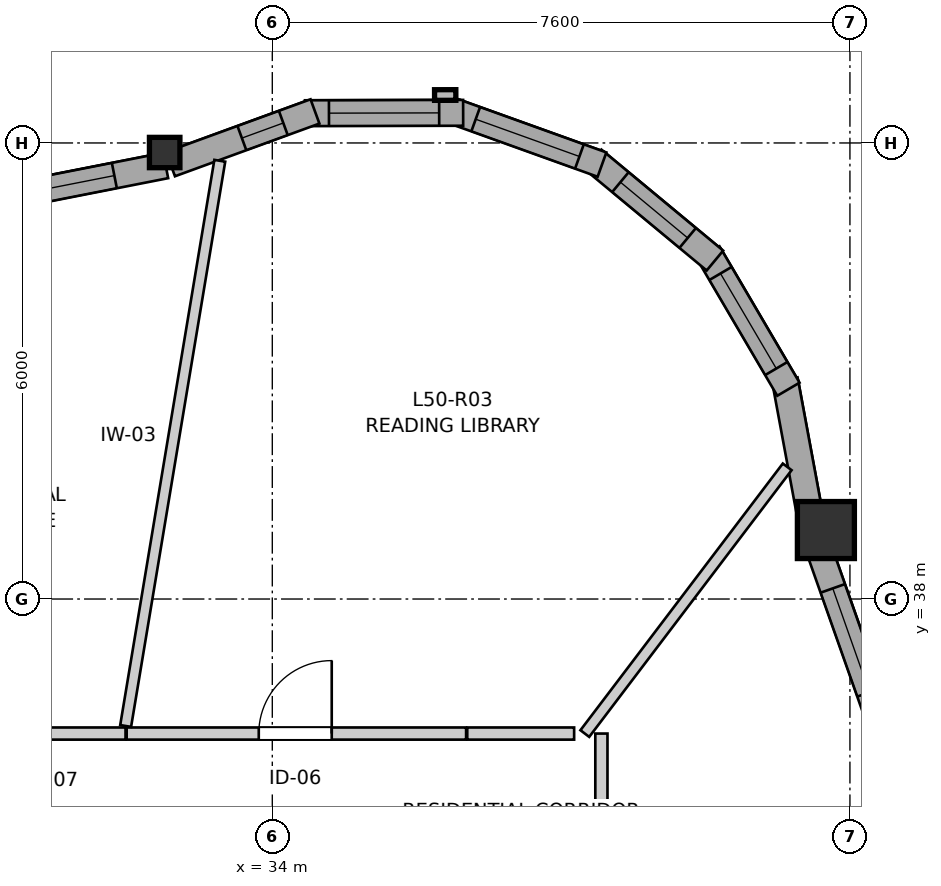
"""IFC4 building model, lengths in metres.
Left out: names, types, materials, properties, quantities, classifications, styles, units other than length and angle.
Written with IfcOpenShell. Run it as: python <this file> out.ifc"""

import sys

from ifc_helpers import new_model, si_unit, direction, frame, frame_2d, origin, origin_2d, place, context, subcontext, project, spatial, rectangle, i_section, extrude, source, transform, mapped, element, fill, save


model = new_model("IFC4")
c1 = context("Model", 3, precision=1e-05, world=origin(), true_north=direction((0.0, 1.0)))
c2 = subcontext(c1, "Body", "Model", "MODEL_VIEW")
j1 = project(units=[si_unit("LENGTHUNIT", "METRE"), si_unit("PLANEANGLEUNIT", "RADIAN")], contexts=[c1])
p1 = place(None, origin())
s1 = spatial("IfcSite", under=j1, at=p1, CompositionType="ELEMENT")
p2 = place(p1, origin())
s2 = spatial("IfcBuilding", under=s1, at=p2, CompositionType="ELEMENT")
p3 = place(p2, frame((0.0, 0.0, 168.2)))
s3 = spatial("IfcBuildingStorey", under=s2, at=p3, CompositionType="ELEMENT", Elevation=168.2)
m1 = source(origin(), c2, "Body", "SweptSolid", [
    extrude(rectangle(XDim=0.75, YDim=0.75, at=origin_2d()), origin(), (0.0, 0.0, 1.0), 2.95),
])
p4 = place(p3, frame((41.284, 38.907, 0.0), z_axis=(0.0, 0.0, 1.0), x_axis=(1.0, 0.0, 0.0)))
e1 = element("IfcColumn", 1, at=p4, inside=s3, PredefinedType="COLUMN", context=c2, shape_type="MappedRepresentation", body=[
    mapped(m1, transform((0.0, 0.0, 0.0), x_axis=(1.0, 0.0, 0.0), y_axis=(0.0, 1.0, 0.0), z_axis=(0.0, 0.0, 1.0), scale=1.0)),
])
m2 = source(origin(), c2, "Body", "SweptSolid", [
    extrude(i_section(OverallWidth=0.401, OverallDepth=0.399, WebThickness=0.023, FlangeThickness=0.036, FilletRadius=0.015, at=origin_2d()), origin(), (0.0, 0.0, 1.0), 2.95),
])
p5 = place(p3, frame((32.584, 43.874, 0.0), z_axis=(0.0, 0.0, 1.0), x_axis=(1.0, 0.0, 0.0)))
e2 = element("IfcColumn", 2, at=p5, inside=s3, PredefinedType="PILASTER", context=c2, shape_type="MappedRepresentation", body=[
    mapped(m2, transform((0.0, 0.0, 0.0), x_axis=(1.0, 0.0, 0.0), y_axis=(0.0, 1.0, 0.0), z_axis=(0.0, 0.0, 1.0), scale=1.0)),
])
p6 = place(p3, frame((42.059, 36.198, 0.0), z_axis=(0.0, 0.0, 1.0), x_axis=(-0.332714406781, 0.943027636668, 0.0)))
e3 = element("IfcWall", 3, at=p6, inside=s3, PredefinedType="SOLIDWALL", context=c2, shape_type="SweptSolid", body=[
    extrude(rectangle(XDim=2.658, YDim=0.34, at=frame_2d((1.329, 0.0))), origin(), (0.0, 0.0, 1.0), 2.53),
])
p7 = place(p6, frame((0.609, 0.0, 0.82)))
e4 = element("IfcOpeningElement", 4, at=p7, cuts=e3, PredefinedType="OPENING", context=c2, shape_type="SweptSolid", body=[
    extrude(rectangle(XDim=1.45, YDim=1.25, at=frame_2d((0.725, 0.625))), frame((0.0, 0.18, 0.0), z_axis=(0.0, -1.0, 0.0), x_axis=(1.0, 0.0, 0.0)), (0.0, 0.0, 1.0), 0.36),
])
p8 = place(p3, frame((41.088, 39.029, 0.0), z_axis=(0.0, 0.0, 1.0), x_axis=(-0.18244577317, 0.983215917209, 0.0)))
e5 = element("IfcWall", 5, at=p8, inside=s3, PredefinedType="SOLIDWALL", context=c2, shape_type="SweptSolid", body=[
    extrude(rectangle(XDim=1.888, YDim=0.34, at=frame_2d((0.944, 0.0))), origin(), (0.0, 0.0, 1.0), 2.53),
])
p9 = place(p3, frame((40.791, 40.76, 0.0), z_axis=(0.0, 0.0, 1.0), x_axis=(-0.506225227923, 0.862401309493, 0.0)))
e6 = element("IfcWall", 6, at=p9, inside=s3, PredefinedType="SOLIDWALL", context=c2, shape_type="SweptSolid", body=[
    extrude(rectangle(XDim=2.081, YDim=0.34, at=frame_2d((1.041, 0.0))), origin(), (0.0, 0.0, 1.0), 2.53),
])
p10 = place(p9, frame((0.315, 0.0, 0.82)))
e7 = element("IfcOpeningElement", 7, at=p10, cuts=e6, PredefinedType="OPENING", context=c2, shape_type="SweptSolid", body=[
    extrude(rectangle(XDim=1.45, YDim=1.25, at=frame_2d((0.725, 0.625))), frame((0.0, 0.18, 0.0), z_axis=(0.0, -1.0, 0.0), x_axis=(1.0, 0.0, 0.0)), (0.0, 0.0, 1.0), 0.36),
])
p11 = place(p3, frame((39.823, 42.453, 0.0), z_axis=(0.0, 0.0, 1.0), x_axis=(-0.769690471148, 0.63841724493, 0.0)))
e8 = element("IfcWall", 8, at=p11, inside=s3, PredefinedType="SOLIDWALL", context=c2, shape_type="SweptSolid", body=[
    extrude(rectangle(XDim=2.081, YDim=0.34, at=frame_2d((1.041, 0.0))), origin(), (0.0, 0.0, 1.0), 2.53),
])
p12 = place(p11, frame((0.466, 0.0, 0.82)))
e9 = element("IfcOpeningElement", 9, at=p12, cuts=e8, PredefinedType="OPENING", context=c2, shape_type="SweptSolid", body=[
    extrude(rectangle(XDim=1.15, YDim=1.2, at=frame_2d((0.575, 0.6))), frame((0.0, 0.18, 0.0), z_axis=(0.0, -1.0, 0.0), x_axis=(1.0, 0.0, 0.0)), (0.0, 0.0, 1.0), 0.36),
])
p13 = place(p3, frame((38.338, 43.715, 0.0), z_axis=(0.0, 0.0, 1.0), x_axis=(-0.941071215914, 0.338208466153, 0.0)))
e10 = element("IfcWall", 10, at=p13, inside=s3, PredefinedType="SOLIDWALL", context=c2, shape_type="SweptSolid", body=[
    extrude(rectangle(XDim=2.081, YDim=0.34, at=frame_2d((1.041, 0.0))), origin(), (0.0, 0.0, 1.0), 2.53),
])
p14 = place(p13, frame((0.315, 0.0, 0.82)))
e11 = element("IfcOpeningElement", 11, at=p14, cuts=e10, PredefinedType="OPENING", context=c2, shape_type="SweptSolid", body=[
    extrude(rectangle(XDim=1.45, YDim=1.25, at=frame_2d((0.725, 0.625))), frame((0.0, 0.18, 0.0), z_axis=(0.0, -1.0, 0.0), x_axis=(1.0, 0.0, 0.0)), (0.0, 0.0, 1.0), 0.36),
])
p15 = place(p3, frame((36.511, 44.396, 0.0), z_axis=(0.0, 0.0, 1.0), x_axis=(-0.999996965272, -0.002463624621, 0.0)))
e12 = element("IfcWall", 12, at=p15, inside=s3, PredefinedType="SOLIDWALL", context=c2, shape_type="SweptSolid", body=[
    extrude(rectangle(XDim=2.081, YDim=0.34, at=frame_2d((1.041, 0.0))), origin(), (0.0, 0.0, 1.0), 2.53),
])
p16 = place(p15, frame((0.316, 0.0, 0.82)))
e13 = element("IfcOpeningElement", 13, at=p16, cuts=e12, PredefinedType="OPENING", context=c2, shape_type="SweptSolid", body=[
    extrude(rectangle(XDim=1.45, YDim=1.25, at=frame_2d((0.725, 0.625))), frame((0.0, 0.18, 0.0), z_axis=(0.0, -1.0, 0.0), x_axis=(1.0, 0.0, 0.0)), (0.0, 0.0, 1.0), 0.36),
])
p17 = place(p3, frame((34.562, 44.415, 0.0), z_axis=(0.0, 0.0, 1.0), x_axis=(-0.939426417976, -0.342750645819, 0.0)))
e14 = element("IfcWall", 14, at=p17, inside=s3, PredefinedType="SOLIDWALL", context=c2, shape_type="SweptSolid", body=[
    extrude(rectangle(XDim=2.023, YDim=0.34, at=frame_2d((1.011, 0.0))), origin(), (0.0, 0.0, 1.0), 2.53),
])
p18 = place(p17, frame((0.444, 0.0, 0.82)))
e15 = element("IfcOpeningElement", 15, at=p18, cuts=e14, PredefinedType="OPENING", context=c2, shape_type="SweptSolid", body=[
    extrude(rectangle(XDim=0.58, YDim=1.35, at=frame_2d((0.29, 0.675))), frame((0.0, 0.18, 0.0), z_axis=(0.0, -1.0, 0.0), x_axis=(1.0, 0.0, 0.0)), (0.0, 0.0, 1.0), 0.36),
])
p19 = place(p3, frame((32.597, 43.704, 0.0), z_axis=(0.0, 0.0, 1.0), x_axis=(-0.981214876679, -0.192918028667, 0.0)))
e16 = element("IfcWall", 16, at=p19, inside=s3, PredefinedType="SOLIDWALL", context=c2, shape_type="SweptSolid", body=[
    extrude(rectangle(XDim=2.746, YDim=0.34, at=frame_2d((1.373, 0.0))), origin(), (0.0, 0.0, 1.0), 2.53),
])
p20 = place(p19, frame((0.688, 0.0, 0.82)))
e17 = element("IfcOpeningElement", 17, at=p20, cuts=e16, PredefinedType="OPENING", context=c2, shape_type="SweptSolid", body=[
    extrude(rectangle(XDim=1.35, YDim=1.45, at=frame_2d((0.675, 0.725))), frame((0.0, 0.18, 0.0), z_axis=(0.0, -1.0, 0.0), x_axis=(1.0, 0.0, 0.0)), (0.0, 0.0, 1.0), 0.36),
])
p21 = place(p3, frame((24.201, 36.23, 0.0), z_axis=(0.0, 0.0, 1.0), x_axis=(1.0, 0.0, 0.0)))
e18 = element("IfcWall", 18, at=p21, inside=s3, PredefinedType="PARTITIONING", context=c2, shape_type="SweptSolid", body=[
    extrude(rectangle(XDim=7.868, YDim=0.16, at=frame_2d((3.934, 0.0))), origin(), (0.0, 0.0, 1.0), 2.95),
])
p22 = place(p21, frame((3.456, 0.0, 0.0)))
e19 = element("IfcOpeningElement", 19, at=p22, cuts=e18, PredefinedType="OPENING", context=c2, shape_type="SweptSolid", body=[
    extrude(rectangle(XDim=0.96, YDim=2.1, at=frame_2d((0.48, 1.05))), frame((0.0, 0.09, 0.0), z_axis=(0.0, -1.0, 0.0), x_axis=(1.0, 0.0, 0.0)), (0.0, 0.0, 1.0), 0.18),
])
p23 = place(p3, frame((32.084, 36.23, 0.0), z_axis=(0.0, 0.0, 1.0), x_axis=(1.0, 0.0, 0.0)))
e20 = element("IfcWall", 20, at=p23, inside=s3, PredefinedType="PARTITIONING", context=c2, shape_type="SweptSolid", body=[
    extrude(rectangle(XDim=4.466, YDim=0.16, at=frame_2d((2.233, 0.0))), origin(), (0.0, 0.0, 1.0), 2.588),
])
p24 = place(p23, frame((1.738, 0.0, 0.0)))
e21 = element("IfcOpeningElement", 21, at=p24, cuts=e20, PredefinedType="OPENING", context=c2, shape_type="SweptSolid", body=[
    extrude(rectangle(XDim=0.96, YDim=2.1, at=frame_2d((0.48, 1.05))), frame((0.0, 0.09, 0.0), z_axis=(0.0, -1.0, 0.0), x_axis=(1.0, 0.0, 0.0)), (0.0, 0.0, 1.0), 0.18),
])
p25 = place(p3, frame((32.071, 36.33, 0.0), z_axis=(0.0, 0.0, 1.0), x_axis=(0.164299199522, 0.986410549942, 0.0)))
e22 = element("IfcWall", 22, at=p25, inside=s3, PredefinedType="PARTITIONING", context=c2, shape_type="SweptSolid", body=[
    extrude(rectangle(XDim=7.538, YDim=0.145, at=frame_2d((3.769, 0.0))), origin(), (0.0, 0.0, 1.0), 2.95),
])
p26 = place(p3, frame((38.112, 36.23, 0.0), z_axis=(0.0, 0.0, 1.0), x_axis=(0.604495658019, 0.796608435453, 0.0)))
e23 = element("IfcWall", 23, at=p26, inside=s3, PredefinedType="PARTITIONING", context=c2, shape_type="SweptSolid", body=[
    extrude(rectangle(XDim=4.405, YDim=0.145, at=frame_2d((2.202, 0.0))), origin(), (0.0, 0.0, 1.0), 2.95),
])
p27 = place(p3, frame((38.33, 34.465, 0.0), z_axis=(0.0, 0.0, 1.0), x_axis=(0.0, 1.0, 0.0)))
e24 = element("IfcWall", 24, at=p27, inside=s3, PredefinedType="PARTITIONING", context=c2, shape_type="SweptSolid", body=[
    extrude(rectangle(XDim=1.765, YDim=0.16, at=frame_2d((0.882, 0.0))), origin(), (0.0, 0.0, 1.0), 2.588),
])
p28 = place(p3, frame((36.565, 36.23, 0.0), z_axis=(0.0, 0.0, 1.0), x_axis=(1.0, 0.0, 0.0)))
e25 = element("IfcWall", 25, at=p28, inside=s3, PredefinedType="PARTITIONING", context=c2, shape_type="SweptSolid", body=[
    extrude(rectangle(XDim=1.406, YDim=0.16, at=frame_2d((0.703, 0.0))), origin(), (0.0, 0.0, 1.0), 2.95),
])
m3 = source(origin(), c2, "Body", "SweptSolid", [
    extrude(rectangle(XDim=1.45, YDim=1.25, at=frame_2d((0.725, 0.625))), frame((0.0, 0.03, 0.0), z_axis=(0.0, -1.0, 0.0), x_axis=(1.0, 0.0, 0.0)), (0.0, 0.0, 1.0), 0.06),
])
p29 = place(p7, origin())
e26 = element("IfcWindow", 26, at=p29, inside=s3, PartitioningType="SINGLE_PANEL", PredefinedType="WINDOW", context=c2, shape_type="MappedRepresentation", body=[
    mapped(m3, transform((0.0, 0.0, 0.0), x_axis=(1.0, 0.0, 0.0), y_axis=(0.0, 1.0, 0.0), z_axis=(0.0, 0.0, 1.0), scale=1.0)),
])
fill(e4, e26)
p30 = place(p10, origin())
e27 = element("IfcWindow", 27, at=p30, inside=s3, PartitioningType="SINGLE_PANEL", PredefinedType="WINDOW", context=c2, shape_type="MappedRepresentation", body=[
    mapped(m3, transform((0.0, 0.0, 0.0), x_axis=(1.0, 0.0, 0.0), y_axis=(0.0, 1.0, 0.0), z_axis=(0.0, 0.0, 1.0), scale=1.0)),
])
fill(e7, e27)
m4 = source(origin(), c2, "Body", "SweptSolid", [
    extrude(rectangle(XDim=1.15, YDim=1.2, at=frame_2d((0.575, 0.6))), frame((0.0, 0.03, 0.0), z_axis=(0.0, -1.0, 0.0), x_axis=(1.0, 0.0, 0.0)), (0.0, 0.0, 1.0), 0.06),
])
p31 = place(p12, origin())
e28 = element("IfcWindow", 28, at=p31, inside=s3, PartitioningType="SINGLE_PANEL", PredefinedType="WINDOW", context=c2, shape_type="MappedRepresentation", body=[
    mapped(m4, transform((0.0, 0.0, 0.0), x_axis=(1.0, 0.0, 0.0), y_axis=(0.0, 1.0, 0.0), z_axis=(0.0, 0.0, 1.0), scale=1.0)),
])
fill(e9, e28)
p32 = place(p14, origin())
e29 = element("IfcWindow", 29, at=p32, inside=s3, PartitioningType="SINGLE_PANEL", PredefinedType="WINDOW", context=c2, shape_type="MappedRepresentation", body=[
    mapped(m3, transform((0.0, 0.0, 0.0), x_axis=(1.0, 0.0, 0.0), y_axis=(0.0, 1.0, 0.0), z_axis=(0.0, 0.0, 1.0), scale=1.0)),
])
fill(e11, e29)
p33 = place(p16, origin())
e30 = element("IfcWindow", 30, at=p33, inside=s3, PartitioningType="SINGLE_PANEL", PredefinedType="WINDOW", context=c2, shape_type="MappedRepresentation", body=[
    mapped(m3, transform((0.0, 0.0, 0.0), x_axis=(1.0, 0.0, 0.0), y_axis=(0.0, 1.0, 0.0), z_axis=(0.0, 0.0, 1.0), scale=1.0)),
])
fill(e13, e30)
m5 = source(origin(), c2, "Body", "SweptSolid", [
    extrude(rectangle(XDim=0.58, YDim=1.35, at=frame_2d((0.29, 0.675))), frame((0.0, 0.03, 0.0), z_axis=(0.0, -1.0, 0.0), x_axis=(1.0, 0.0, 0.0)), (0.0, 0.0, 1.0), 0.06),
])
p34 = place(p18, origin())
e31 = element("IfcWindow", 31, at=p34, inside=s3, PartitioningType="SINGLE_PANEL", PredefinedType="WINDOW", context=c2, shape_type="MappedRepresentation", body=[
    mapped(m5, transform((0.0, 0.0, 0.0), x_axis=(1.0, 0.0, 0.0), y_axis=(0.0, 1.0, 0.0), z_axis=(0.0, 0.0, 1.0), scale=1.0)),
])
fill(e15, e31)
m6 = source(origin(), c2, "Body", "SweptSolid", [
    extrude(rectangle(XDim=1.35, YDim=1.45, at=frame_2d((0.675, 0.725))), frame((0.0, 0.03, 0.0), z_axis=(0.0, -1.0, 0.0), x_axis=(1.0, 0.0, 0.0)), (0.0, 0.0, 1.0), 0.06),
])
p35 = place(p20, origin())
e32 = element("IfcWindow", 32, at=p35, inside=s3, PartitioningType="SINGLE_PANEL", PredefinedType="WINDOW", context=c2, shape_type="MappedRepresentation", body=[
    mapped(m6, transform((0.0, 0.0, 0.0), x_axis=(1.0, 0.0, 0.0), y_axis=(0.0, 1.0, 0.0), z_axis=(0.0, 0.0, 1.0), scale=1.0)),
])
fill(e17, e32)
m7 = source(origin(), c2, "Body", "SweptSolid", [
    extrude(rectangle(XDim=0.96, YDim=2.1, at=frame_2d((0.48, 1.05))), frame((0.0, 0.025, 0.0), z_axis=(0.0, -1.0, 0.0), x_axis=(1.0, 0.0, 0.0)), (0.0, 0.0, 1.0), 0.05),
])
p36 = place(p24, origin())
e33 = element("IfcDoor", 33, at=p36, inside=s3, OperationType="SINGLE_SWING_RIGHT", PredefinedType="DOOR", context=c2, shape_type="MappedRepresentation", body=[
    mapped(m7, transform((0.0, 0.0, 0.0), x_axis=(1.0, 0.0, 0.0), y_axis=(0.0, 1.0, 0.0), z_axis=(0.0, 0.0, 1.0), scale=1.0)),
])
fill(e21, e33)
save(model, sys.argv[1])
